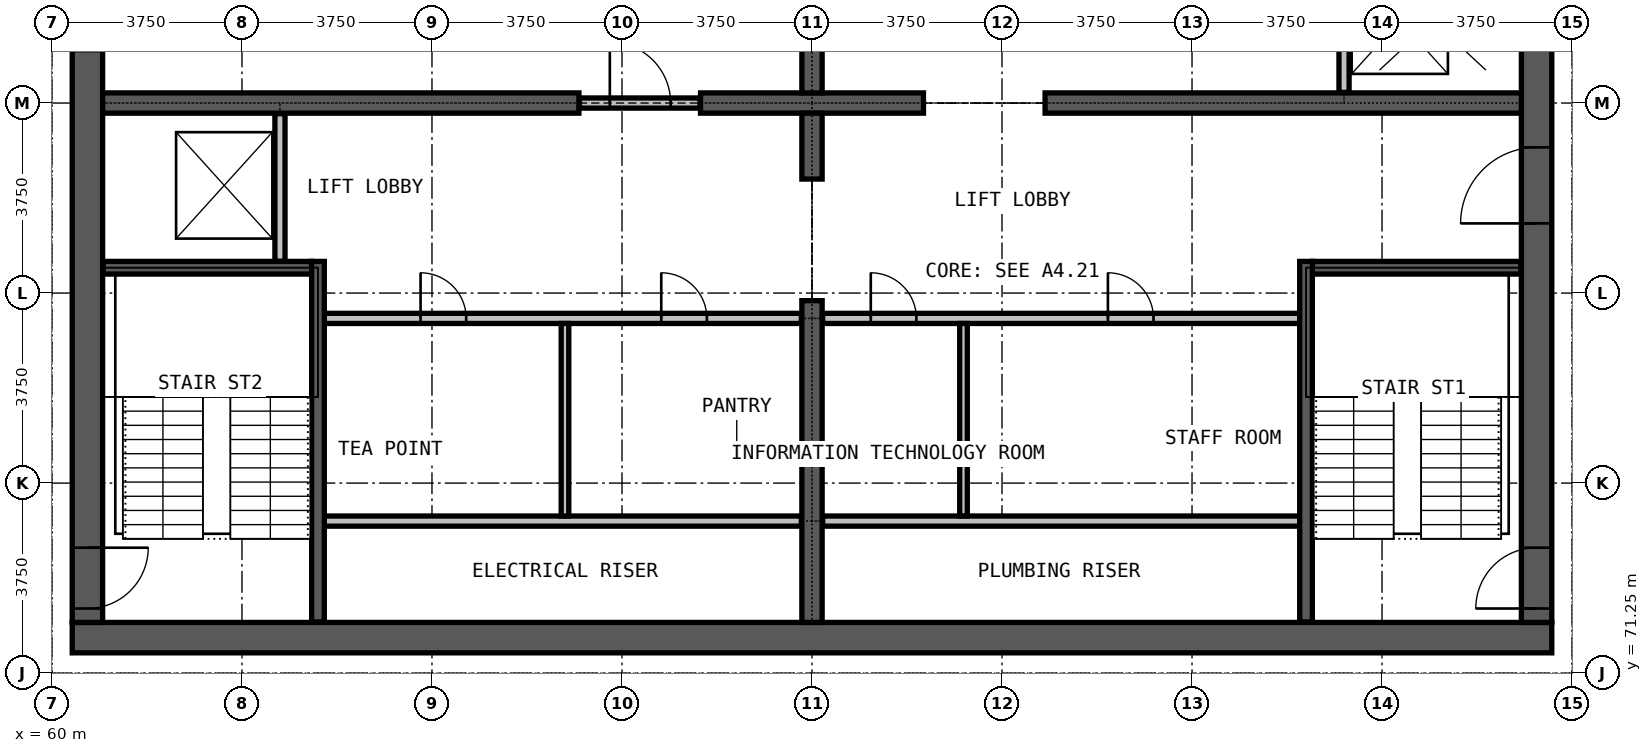
"""IFC4 building model, lengths in metres.
Left out: names, types, materials, properties, quantities, classifications, styles, units other than length and angle.
Written with IfcOpenShell. Run it as: python <this file> out.ifc"""

import sys

from ifc_helpers import new_model, si_unit, direction, frame, frame_2d, origin, place, context, subcontext, project, spatial, rectangle, extrude, element, fill, save


model = new_model("IFC4")
c1 = context("Model", 3, precision=1e-05, world=origin(), true_north=direction((0.0, 1.0)))
c2 = subcontext(c1, "Body", "Model", "MODEL_VIEW")
j1 = project(units=[si_unit("LENGTHUNIT", "METRE"), si_unit("PLANEANGLEUNIT", "RADIAN")], contexts=[c1])
p1 = place(None, origin())
s1 = spatial("IfcSite", under=j1, at=p1, CompositionType="ELEMENT")
p2 = place(p1, origin())
s2 = spatial("IfcBuilding", under=s1, at=p2, CompositionType="ELEMENT")
p3 = place(p2, frame((0.0, 0.0, 195.9)))
s3 = spatial("IfcBuildingStorey", under=s2, at=p3, CompositionType="ELEMENT", Elevation=195.9)
p4 = place(p3, frame((60.4, 71.95, 0.0), z_axis=(0.0, 0.0, 1.0), x_axis=(1.0, 0.0, 0.0)))
e1 = element("IfcWall", 1, at=p4, inside=s3, PredefinedType="SHEAR", context=c2, shape_type="SweptSolid", body=[
    extrude(rectangle(XDim=29.2, YDim=0.6, at=frame_2d((14.6, 0.0))), origin(), (0.0, 0.0, 1.0), 3.6),
])
p5 = place(p3, frame((89.3, 72.25, 0.0), z_axis=(0.0, 0.0, 1.0), x_axis=(0.0, 1.0, 0.0)))
e2 = element("IfcWall", 2, at=p5, inside=s3, PredefinedType="SHEAR", context=c2, shape_type="SweptSolid", body=[
    extrude(rectangle(XDim=20.5, YDim=0.6, at=frame_2d((10.25, 0.0))), origin(), (0.0, 0.0, 1.0), 3.6),
])
p6 = place(p5, frame((0.275, 0.0, 0.0)))
e3 = element("IfcOpeningElement", 3, at=p6, cuts=e2, PredefinedType="OPENING", context=c2, shape_type="SweptSolid", body=[
    extrude(rectangle(XDim=1.2, YDim=2.2, at=frame_2d((0.6, 1.1))), frame((0.0, 0.31, 0.0), z_axis=(0.0, -1.0, 0.0), x_axis=(1.0, 0.0, 0.0)), (0.0, 0.0, 1.0), 0.62),
])
p7 = place(p5, frame((13.775, 0.0, 0.0)))
e4 = element("IfcOpeningElement", 4, at=p7, cuts=e2, PredefinedType="OPENING", context=c2, shape_type="SweptSolid", body=[
    extrude(rectangle(XDim=1.2, YDim=2.2, at=frame_2d((0.6, 1.1))), frame((0.0, 0.31, 0.0), z_axis=(0.0, -1.0, 0.0), x_axis=(1.0, 0.0, 0.0)), (0.0, 0.0, 1.0), 0.62),
])
p8 = place(p5, frame((7.875, 0.0, 0.0)))
e5 = element("IfcOpeningElement", 5, at=p8, cuts=e2, PredefinedType="OPENING", context=c2, shape_type="SweptSolid", body=[
    extrude(rectangle(XDim=1.5, YDim=2.2, at=frame_2d((0.75, 1.1))), frame((0.0, 0.31, 0.0), z_axis=(0.0, -1.0, 0.0), x_axis=(1.0, 0.0, 0.0)), (0.0, 0.0, 1.0), 0.62),
])
p9 = place(p3, frame((60.7, 92.75, 0.0), z_axis=(0.0, 0.0, 1.0), x_axis=(0.0, -1.0, 0.0)))
e6 = element("IfcWall", 6, at=p9, inside=s3, PredefinedType="SHEAR", context=c2, shape_type="SweptSolid", body=[
    extrude(rectangle(XDim=20.5, YDim=0.6, at=frame_2d((10.25, 0.0))), origin(), (0.0, 0.0, 1.0), 3.6),
])
p10 = place(p9, frame((19.025, 0.0, 0.0)))
e7 = element("IfcOpeningElement", 7, at=p10, cuts=e6, PredefinedType="OPENING", context=c2, shape_type="SweptSolid", body=[
    extrude(rectangle(XDim=1.2, YDim=2.2, at=frame_2d((0.6, 1.1))), frame((0.0, 0.31, 0.0), z_axis=(0.0, -1.0, 0.0), x_axis=(1.0, 0.0, 0.0)), (0.0, 0.0, 1.0), 0.62),
])
p11 = place(p9, frame((8.025, 0.0, 0.0)))
e8 = element("IfcOpeningElement", 8, at=p11, cuts=e6, PredefinedType="OPENING", context=c2, shape_type="SweptSolid", body=[
    extrude(rectangle(XDim=1.2, YDim=2.2, at=frame_2d((0.6, 1.1))), frame((0.0, 0.31, 0.0), z_axis=(0.0, -1.0, 0.0), x_axis=(1.0, 0.0, 0.0)), (0.0, 0.0, 1.0), 0.62),
])
p12 = place(p3, frame((61.0, 82.5, 0.0), z_axis=(0.0, 0.0, 1.0), x_axis=(1.0, 0.0, 0.0)))
e9 = element("IfcWall", 9, at=p12, inside=s3, PredefinedType="SHEAR", context=c2, shape_type="SweptSolid", body=[
    extrude(rectangle(XDim=9.4, YDim=0.4, at=frame_2d((4.7, 0.0))), origin(), (0.0, 0.0, 1.0), 3.6),
])
p13 = place(p3, frame((72.8, 82.5, 0.0), z_axis=(0.0, 0.0, 1.0), x_axis=(1.0, 0.0, 0.0)))
e10 = element("IfcWall", 10, at=p13, inside=s3, PredefinedType="SHEAR", context=c2, shape_type="SweptSolid", body=[
    extrude(rectangle(XDim=4.4, YDim=0.4, at=frame_2d((2.2, 0.0))), origin(), (0.0, 0.0, 1.0), 3.6),
])
p14 = place(p3, frame((79.6, 82.5, 0.0), z_axis=(0.0, 0.0, 1.0), x_axis=(1.0, 0.0, 0.0)))
e11 = element("IfcWall", 11, at=p14, inside=s3, PredefinedType="SHEAR", context=c2, shape_type="SweptSolid", body=[
    extrude(rectangle(XDim=9.4, YDim=0.4, at=frame_2d((4.7, 0.0))), origin(), (0.0, 0.0, 1.0), 3.6),
])
p15 = place(p3, frame((75.0, 72.25, 0.0), z_axis=(0.0, 0.0, 1.0), x_axis=(0.0, 1.0, 0.0)))
e12 = element("IfcWall", 12, at=p15, inside=s3, PredefinedType="SHEAR", context=c2, shape_type="SweptSolid", body=[
    extrude(rectangle(XDim=6.35, YDim=0.4, at=frame_2d((3.175, 0.0))), origin(), (0.0, 0.0, 1.0), 3.6),
])
for number, where, z_axis, x_axis in (
    (13, (75.0, 81.0, 0.0), (0.0, 0.0, 1.0), (0.0, 1.0, 0.0)),
    (14, (75.0, 82.7, 0.0), (0.0, 0.0, 1.0), (0.0, 1.0, 0.0)),
):
    element("IfcWall", number, at=place(p3, frame(where, z_axis=z_axis, x_axis=x_axis)), inside=s3, PredefinedType="SHEAR", context=c2, shape_type="SweptSolid", body=[
        extrude(rectangle(XDim=1.3, YDim=0.4, at=frame_2d((0.65, 0.0))), origin(), (0.0, 0.0, 1.0), 3.6),
    ])
for number, where, z_axis, x_axis in (
    (15, (65.375, 74.25, 0.0), (0.0, 0.0, 1.0), (1.0, 0.0, 0.0)),
    (16, (75.21, 74.25, 0.0), (0.0, 0.0, 1.0), (1.0, 0.0, 0.0)),
):
    element("IfcWall", number, at=place(p3, frame(where, z_axis=z_axis, x_axis=x_axis)), inside=s3, PredefinedType="PARTITIONING", context=c2, shape_type="SweptSolid", body=[
        extrude(rectangle(XDim=9.415, YDim=0.2, at=frame_2d((4.708, 0.0))), origin(), (0.0, 0.0, 1.0), 3.3),
    ])
p16 = place(p3, frame((65.375, 78.25, 0.0), z_axis=(0.0, 0.0, 1.0), x_axis=(1.0, 0.0, 0.0)))
e17 = element("IfcWall", 17, at=p16, inside=s3, PredefinedType="PARTITIONING", context=c2, shape_type="SweptSolid", body=[
    extrude(rectangle(XDim=9.415, YDim=0.2, at=frame_2d((4.708, 0.0))), origin(), (0.0, 0.0, 1.0), 3.3),
])
p17 = place(p16, frame((1.9, 0.0, 0.0)))
e18 = element("IfcOpeningElement", 18, at=p17, cuts=e17, PredefinedType="OPENING", context=c2, shape_type="SweptSolid", body=[
    extrude(rectangle(XDim=0.9, YDim=2.2, at=frame_2d((0.45, 1.1))), frame((0.0, 0.11, 0.0), z_axis=(0.0, -1.0, 0.0), x_axis=(1.0, 0.0, 0.0)), (0.0, 0.0, 1.0), 0.22),
])
p18 = place(p16, frame((6.65, 0.0, 0.0)))
e19 = element("IfcOpeningElement", 19, at=p18, cuts=e17, PredefinedType="OPENING", context=c2, shape_type="SweptSolid", body=[
    extrude(rectangle(XDim=0.9, YDim=2.2, at=frame_2d((0.45, 1.1))), frame((0.0, 0.11, 0.0), z_axis=(0.0, -1.0, 0.0), x_axis=(1.0, 0.0, 0.0)), (0.0, 0.0, 1.0), 0.22),
])
p19 = place(p3, frame((75.21, 78.25, 0.0), z_axis=(0.0, 0.0, 1.0), x_axis=(1.0, 0.0, 0.0)))
e20 = element("IfcWall", 20, at=p19, inside=s3, PredefinedType="PARTITIONING", context=c2, shape_type="SweptSolid", body=[
    extrude(rectangle(XDim=9.415, YDim=0.2, at=frame_2d((4.708, 0.0))), origin(), (0.0, 0.0, 1.0), 3.3),
])
p20 = place(p19, frame((0.95, 0.0, 0.0)))
e21 = element("IfcOpeningElement", 21, at=p20, cuts=e20, PredefinedType="OPENING", context=c2, shape_type="SweptSolid", body=[
    extrude(rectangle(XDim=0.9, YDim=2.2, at=frame_2d((0.45, 1.1))), frame((0.0, 0.11, 0.0), z_axis=(0.0, -1.0, 0.0), x_axis=(1.0, 0.0, 0.0)), (0.0, 0.0, 1.0), 0.22),
])
p21 = place(p19, frame((5.63, 0.0, 0.0)))
e22 = element("IfcOpeningElement", 22, at=p21, cuts=e20, PredefinedType="OPENING", context=c2, shape_type="SweptSolid", body=[
    extrude(rectangle(XDim=0.9, YDim=2.2, at=frame_2d((0.45, 1.1))), frame((0.0, 0.11, 0.0), z_axis=(0.0, -1.0, 0.0), x_axis=(1.0, 0.0, 0.0)), (0.0, 0.0, 1.0), 0.22),
])
p22 = place(p3, frame((70.41, 82.5, 0.0), z_axis=(0.0, 0.0, 1.0), x_axis=(1.0, 0.0, 0.0)))
e23 = element("IfcWall", 23, at=p22, inside=s3, PredefinedType="PARTITIONING", context=c2, shape_type="SweptSolid", body=[
    extrude(rectangle(XDim=2.38, YDim=0.2, at=frame_2d((1.19, 0.0))), origin(), (0.0, 0.0, 1.0), 2.4),
])
p23 = place(p22, frame((0.6, 0.0, 0.0)))
e24 = element("IfcOpeningElement", 24, at=p23, cuts=e23, PredefinedType="OPENING", context=c2, shape_type="SweptSolid", body=[
    extrude(rectangle(XDim=1.2, YDim=2.2, at=frame_2d((0.6, 1.1))), frame((0.0, 0.11, 0.0), z_axis=(0.0, -1.0, 0.0), x_axis=(1.0, 0.0, 0.0)), (0.0, 0.0, 1.0), 0.22),
])
for number, where, z_axis, x_axis in (
    (25, (70.125, 74.35, 0.0), (0.0, 0.0, 1.0), (0.0, 1.0, 0.0)),
    (26, (77.99, 74.35, 0.0), (0.0, 0.0, 1.0), (0.0, 1.0, 0.0)),
):
    element("IfcWall", number, at=place(p3, frame(where, z_axis=z_axis, x_axis=x_axis)), inside=s3, PredefinedType="PARTITIONING", context=c2, shape_type="SweptSolid", body=[
        extrude(rectangle(XDim=3.8, YDim=0.15, at=frame_2d((1.9, 0.0))), origin(), (0.0, 0.0, 1.0), 3.3),
    ])
p24 = place(p3, frame((64.5, 79.375, 0.0), z_axis=(0.0, 0.0, 1.0), x_axis=(0.0, 1.0, 0.0)))
e27 = element("IfcWall", 27, at=p24, inside=s3, PredefinedType="PARTITIONING", context=c2, shape_type="SweptSolid", body=[
    extrude(rectangle(XDim=2.915, YDim=0.2, at=frame_2d((1.458, 0.0))), origin(), (0.0, 0.0, 1.0), 3.3),
])
p25 = place(p3, frame((85.5, 82.71, 0.0), z_axis=(0.0, 0.0, 1.0), x_axis=(0.0, 1.0, 0.0)))
e28 = element("IfcWall", 28, at=p25, inside=s3, PredefinedType="PARTITIONING", context=c2, shape_type="SweptSolid", body=[
    extrude(rectangle(XDim=2.915, YDim=0.2, at=frame_2d((1.458, 0.0))), origin(), (0.0, 0.0, 1.0), 3.3),
])
p26 = place(p25, frame((0.9, 0.0, 0.0)))
e29 = element("IfcOpeningElement", 29, at=p26, cuts=e28, PredefinedType="OPENING", context=c2, shape_type="SweptSolid", body=[
    extrude(rectangle(XDim=1.1, YDim=2.2, at=frame_2d((0.55, 1.1))), frame((0.0, 0.11, 0.0), z_axis=(0.0, -1.0, 0.0), x_axis=(1.0, 0.0, 0.0)), (0.0, 0.0, 1.0), 0.22),
])
for number, where, z_axis, x_axis in (
    (30, (61.01, 79.25, 0.0), (0.0, 0.0, 1.0), (1.0, 0.0, 0.0)),
    (31, (84.875, 79.25, 0.0), (0.0, 0.0, 1.0), (1.0, 0.0, 0.0)),
):
    element("IfcWall", number, at=place(p3, frame(where, z_axis=z_axis, x_axis=x_axis)), inside=s3, PredefinedType="PARTITIONING", context=c2, shape_type="SweptSolid", body=[
        extrude(rectangle(XDim=4.115, YDim=0.25, at=frame_2d((2.058, 0.0))), origin(), (0.0, 0.0, 1.0), 3.3),
    ])
for number, where, z_axis, x_axis in (
    (32, (65.25, 72.26, 0.0), (0.0, 0.0, 1.0), (0.0, 1.0, 0.0)),
    (33, (84.75, 72.26, 0.0), (0.0, 0.0, 1.0), (0.0, 1.0, 0.0)),
):
    element("IfcWall", number, at=place(p3, frame(where, z_axis=z_axis, x_axis=x_axis)), inside=s3, PredefinedType="PARTITIONING", context=c2, shape_type="SweptSolid", body=[
        extrude(rectangle(XDim=7.115, YDim=0.25, at=frame_2d((3.558, 0.0))), origin(), (0.0, 0.0, 1.0), 3.3),
    ])
p27 = place(p23, origin())
e34 = element("IfcDoor", 34, at=p27, inside=s3, OperationType="SINGLE_SWING_RIGHT", PredefinedType="DOOR", context=c2, shape_type="SweptSolid", body=[
    extrude(rectangle(XDim=1.2, YDim=2.2, at=frame_2d((0.6, 1.1))), frame((0.0, 0.025, 0.0), z_axis=(0.0, -1.0, 0.0), x_axis=(1.0, 0.0, 0.0)), (0.0, 0.0, 1.0), 0.05),
])
fill(e24, e34)
p28 = place(p6, origin())
e35 = element("IfcDoor", 35, at=p28, inside=s3, OperationType="SINGLE_SWING_LEFT", PredefinedType="DOOR", context=c2, shape_type="SweptSolid", body=[
    extrude(rectangle(XDim=1.2, YDim=2.2, at=frame_2d((0.6, 1.1))), frame((0.0, 0.025, 0.0), z_axis=(0.0, -1.0, 0.0), x_axis=(1.0, 0.0, 0.0)), (0.0, 0.0, 1.0), 0.05),
])
fill(e3, e35)
p29 = place(p10, origin())
e36 = element("IfcDoor", 36, at=p29, inside=s3, OperationType="SINGLE_SWING_RIGHT", PredefinedType="DOOR", context=c2, shape_type="SweptSolid", body=[
    extrude(rectangle(XDim=1.2, YDim=2.2, at=frame_2d((0.6, 1.1))), frame((0.0, 0.025, 0.0), z_axis=(0.0, -1.0, 0.0), x_axis=(1.0, 0.0, 0.0)), (0.0, 0.0, 1.0), 0.05),
])
fill(e7, e36)
p30 = place(p8, origin())
e37 = element("IfcDoor", 37, at=p30, inside=s3, OperationType="DOUBLE_DOOR_SINGLE_SWING", PredefinedType="DOOR", context=c2, shape_type="SweptSolid", body=[
    extrude(rectangle(XDim=1.5, YDim=2.2, at=frame_2d((0.75, 1.1))), frame((0.0, 0.025, 0.0), z_axis=(0.0, -1.0, 0.0), x_axis=(1.0, 0.0, 0.0)), (0.0, 0.0, 1.0), 0.05),
])
fill(e5, e37)
p31 = place(p17, origin())
e38 = element("IfcDoor", 38, at=p31, inside=s3, OperationType="SINGLE_SWING_LEFT", PredefinedType="DOOR", context=c2, shape_type="SweptSolid", body=[
    extrude(rectangle(XDim=0.9, YDim=2.2, at=frame_2d((0.45, 1.1))), frame((0.0, 0.025, 0.0), z_axis=(0.0, -1.0, 0.0), x_axis=(1.0, 0.0, 0.0)), (0.0, 0.0, 1.0), 0.05),
])
fill(e18, e38)
p32 = place(p18, origin())
e39 = element("IfcDoor", 39, at=p32, inside=s3, OperationType="SINGLE_SWING_RIGHT", PredefinedType="DOOR", context=c2, shape_type="SweptSolid", body=[
    extrude(rectangle(XDim=0.9, YDim=2.2, at=frame_2d((0.45, 1.1))), frame((0.0, 0.025, 0.0), z_axis=(0.0, -1.0, 0.0), x_axis=(1.0, 0.0, 0.0)), (0.0, 0.0, 1.0), 0.05),
])
fill(e19, e39)
p33 = place(p20, origin())
e40 = element("IfcDoor", 40, at=p33, inside=s3, OperationType="SINGLE_SWING_RIGHT", PredefinedType="DOOR", context=c2, shape_type="SweptSolid", body=[
    extrude(rectangle(XDim=0.9, YDim=2.2, at=frame_2d((0.45, 1.1))), frame((0.0, 0.025, 0.0), z_axis=(0.0, -1.0, 0.0), x_axis=(1.0, 0.0, 0.0)), (0.0, 0.0, 1.0), 0.05),
])
fill(e21, e40)
p34 = place(p21, origin())
e41 = element("IfcDoor", 41, at=p34, inside=s3, OperationType="SINGLE_SWING_LEFT", PredefinedType="DOOR", context=c2, shape_type="SweptSolid", body=[
    extrude(rectangle(XDim=0.9, YDim=2.2, at=frame_2d((0.45, 1.1))), frame((0.0, 0.025, 0.0), z_axis=(0.0, -1.0, 0.0), x_axis=(1.0, 0.0, 0.0)), (0.0, 0.0, 1.0), 0.05),
])
fill(e22, e41)
save(model, sys.argv[1])
